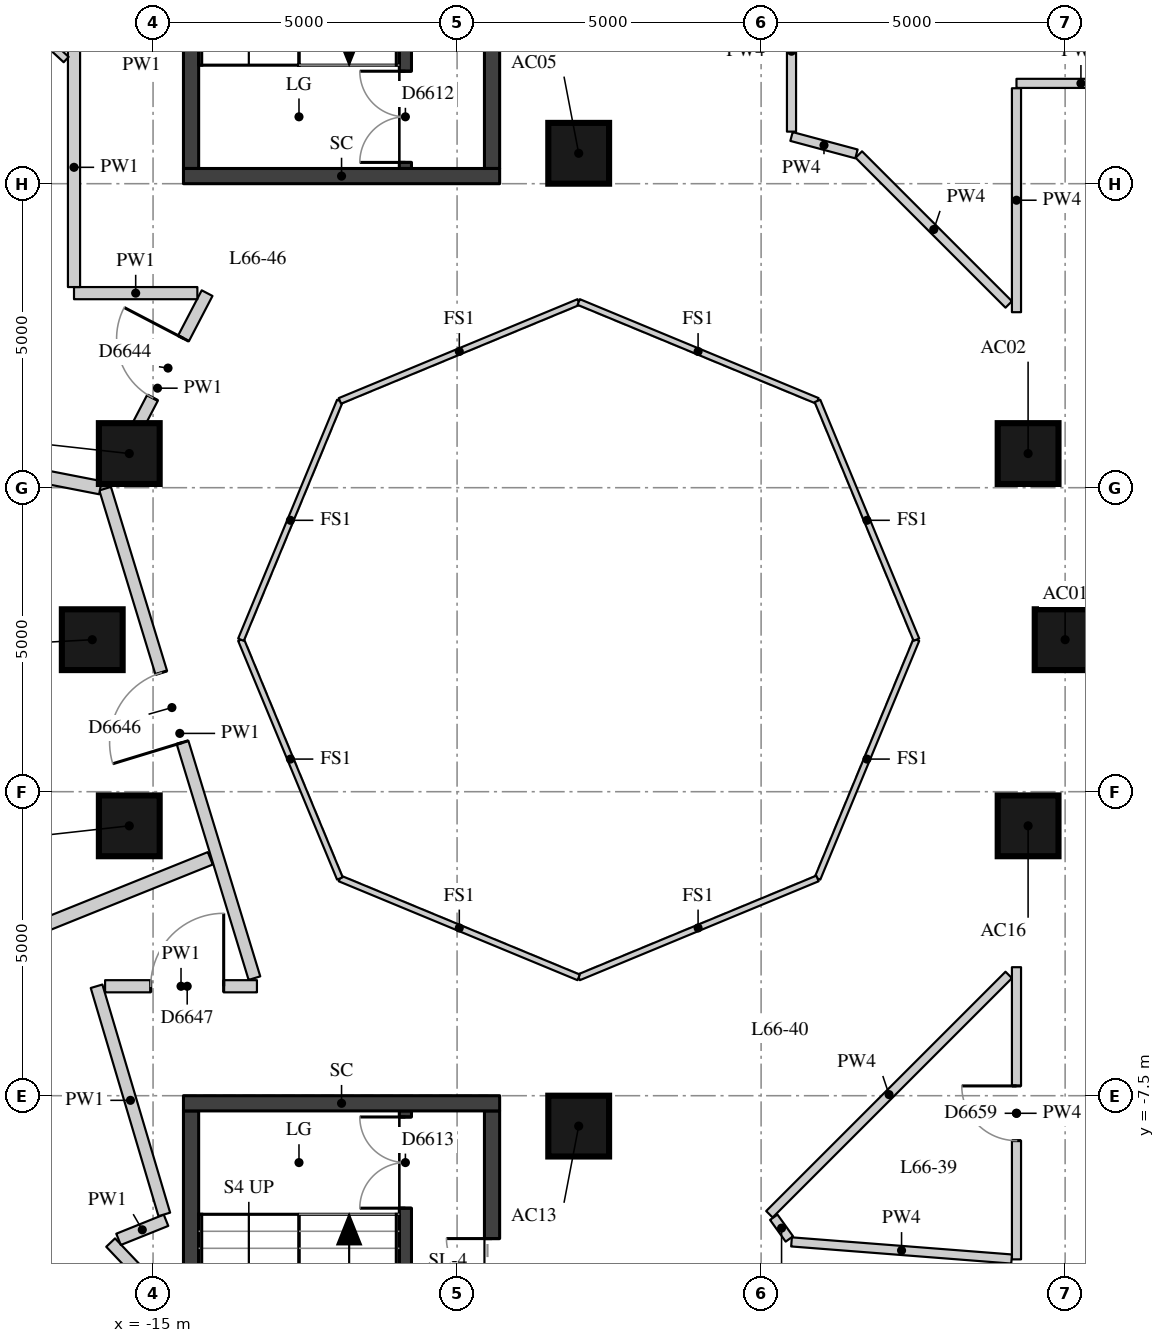
"""IFC4 building model, lengths in metres.
Left out: names, types, materials, properties, quantities, classifications, styles, units other than length and angle.
Written with IfcOpenShell. Run it as: python <this file> out.ifc"""

import sys

from ifc_helpers import new_model, si_unit, direction, frame, frame_2d, origin, origin_2d, place, context, subcontext, project, spatial, rectangle, extrude, element, fill, save


model = new_model("IFC4")
c1 = context("Model", 3, precision=1e-05, world=origin(), true_north=direction((0.0, 1.0)))
c2 = subcontext(c1, "Body", "Model", "MODEL_VIEW")
j1 = project(units=[si_unit("LENGTHUNIT", "METRE"), si_unit("PLANEANGLEUNIT", "RADIAN")], contexts=[c1])
p1 = place(None, origin())
s1 = spatial("IfcSite", under=j1, at=p1, CompositionType="ELEMENT")
p2 = place(p1, origin())
s2 = spatial("IfcBuilding", under=s1, at=p2, CompositionType="ELEMENT")
p3 = place(p2, frame((0.0, 0.0, 233.3)))
s3 = spatial("IfcBuildingStorey", under=s2, at=p3, CompositionType="ELEMENT", Elevation=233.3)
for number, where, z_axis, x_axis in (
    (1, (0.0, 0.0, 0.0), (0.0, 0.0, 1.0), (1.0, 0.0, 0.0)),
    (2, (-0.609, 3.062, 0.0), (0.0, 0.0, 1.0), (1.0, 0.0, 0.0)),
    (3, (-8.0, 8.0, 0.0), (0.0, 0.0, 1.0), (1.0, 0.0, 0.0)),
    (4, (-15.391, 3.062, 0.0), (0.0, 0.0, 1.0), (1.0, 0.0, 0.0)),
    (5, (-16.0, 0.0, 0.0), (0.0, 0.0, 1.0), (1.0, 0.0, 0.0)),
    (6, (-15.391, -3.062, 0.0), (0.0, 0.0, 1.0), (1.0, 0.0, 0.0)),
    (7, (-8.0, -8.0, 0.0), (0.0, 0.0, 1.0), (1.0, 0.0, 0.0)),
    (8, (-0.609, -3.062, 0.0), (0.0, 0.0, 1.0), (1.0, 0.0, 0.0)),
):
    element("IfcColumn", number, at=place(p3, frame(where, z_axis=z_axis, x_axis=x_axis)), inside=s3, PredefinedType="COLUMN", context=c2, shape_type="SweptSolid", body=[
        extrude(rectangle(XDim=1.0, YDim=1.0, at=origin_2d()), origin(), (0.0, 0.0, 1.0), 3.3),
    ])
p4 = place(p3, frame((-10.85, 7.75, 0.0), z_axis=(0.0, 0.0, 1.0), x_axis=(0.0, 1.0, 0.0)))
e9 = element("IfcWall", 9, at=p4, inside=s3, PredefinedType="SHEAR", context=c2, shape_type="SweptSolid", body=[
    extrude(rectangle(XDim=6.0, YDim=0.2, at=frame_2d((3.0, 0.0))), origin(), (0.0, 0.0, 1.0), 3.02),
])
p5 = place(p4, frame((0.1, 0.0, 0.0)))
e10 = element("IfcOpeningElement", 10, at=p5, cuts=e9, PredefinedType="OPENING", context=c2, shape_type="SweptSolid", body=[
    extrude(rectangle(XDim=1.5, YDim=2.1, at=frame_2d((0.75, 1.05))), frame((0.0, 0.11, 0.0), z_axis=(0.0, -1.0, 0.0), x_axis=(1.0, 0.0, 0.0)), (0.0, 0.0, 1.0), 0.22),
])
p6 = place(p3, frame((-10.85, -13.75, 0.0), z_axis=(0.0, 0.0, 1.0), x_axis=(0.0, 1.0, 0.0)))
e11 = element("IfcWall", 11, at=p6, inside=s3, PredefinedType="SHEAR", context=c2, shape_type="SweptSolid", body=[
    extrude(rectangle(XDim=6.0, YDim=0.2, at=frame_2d((3.0, 0.0))), origin(), (0.0, 0.0, 1.0), 3.02),
])
p7 = place(p6, frame((4.4, 0.0, 0.0)))
e12 = element("IfcOpeningElement", 12, at=p7, cuts=e11, PredefinedType="OPENING", context=c2, shape_type="SweptSolid", body=[
    extrude(rectangle(XDim=1.5, YDim=2.1, at=frame_2d((0.75, 1.05))), frame((0.0, 0.11, 0.0), z_axis=(0.0, -1.0, 0.0), x_axis=(1.0, 0.0, 0.0)), (0.0, 0.0, 1.0), 0.22),
])
p8 = place(p3, frame((-14.375, 7.75, -0.28), z_axis=(0.0, 0.0, 1.0), x_axis=(0.0, 1.0, 0.0)))
e13 = element("IfcWall", 13, at=p8, inside=s3, PredefinedType="SHEAR", context=c2, shape_type="SweptSolid", body=[
    extrude(rectangle(XDim=6.0, YDim=0.25, at=frame_2d((3.0, 0.0))), origin(), (0.0, 0.0, 1.0), 3.3),
])
p9 = place(p3, frame((-9.425, 7.75, -0.28), z_axis=(0.0, 0.0, 1.0), x_axis=(0.0, 1.0, 0.0)))
e14 = element("IfcWall", 14, at=p9, inside=s3, PredefinedType="SHEAR", context=c2, shape_type="SweptSolid", body=[
    extrude(rectangle(XDim=6.0, YDim=0.25, at=frame_2d((3.0, 0.0))), origin(), (0.0, 0.0, 1.0), 3.3),
])
p10 = place(p9, frame((2.1, 0.0, 0.28)))
e15 = element("IfcOpeningElement", 15, at=p10, cuts=e14, PredefinedType="OPENING", context=c2, shape_type="SweptSolid", body=[
    extrude(rectangle(XDim=1.5, YDim=2.1, at=frame_2d((0.75, 1.05))), frame((0.0, 0.135, 0.0), z_axis=(0.0, -1.0, 0.0), x_axis=(1.0, 0.0, 0.0)), (0.0, 0.0, 1.0), 0.27),
])
p11 = place(p3, frame((-14.5, 7.625, -0.28), z_axis=(0.0, 0.0, 1.0), x_axis=(1.0, 0.0, 0.0)))
e16 = element("IfcWall", 16, at=p11, inside=s3, PredefinedType="SHEAR", context=c2, shape_type="SweptSolid", body=[
    extrude(rectangle(XDim=5.2, YDim=0.25, at=frame_2d((2.6, 0.0))), origin(), (0.0, 0.0, 1.0), 3.3),
])
p12 = place(p3, frame((-14.375, -13.75, -0.28), z_axis=(0.0, 0.0, 1.0), x_axis=(0.0, 1.0, 0.0)))
e17 = element("IfcWall", 17, at=p12, inside=s3, PredefinedType="SHEAR", context=c2, shape_type="SweptSolid", body=[
    extrude(rectangle(XDim=6.0, YDim=0.25, at=frame_2d((3.0, 0.0))), origin(), (0.0, 0.0, 1.0), 3.3),
])
p13 = place(p3, frame((-9.425, -13.75, -0.28), z_axis=(0.0, 0.0, 1.0), x_axis=(0.0, 1.0, 0.0)))
e18 = element("IfcWall", 18, at=p13, inside=s3, PredefinedType="SHEAR", context=c2, shape_type="SweptSolid", body=[
    extrude(rectangle(XDim=6.0, YDim=0.25, at=frame_2d((3.0, 0.0))), origin(), (0.0, 0.0, 1.0), 3.3),
])
p14 = place(p13, frame((2.4, 0.0, 0.28)))
e19 = element("IfcOpeningElement", 19, at=p14, cuts=e18, PredefinedType="OPENING", context=c2, shape_type="SweptSolid", body=[
    extrude(rectangle(XDim=1.5, YDim=2.1, at=frame_2d((0.75, 1.05))), frame((0.0, 0.135, 0.0), z_axis=(0.0, -1.0, 0.0), x_axis=(1.0, 0.0, 0.0)), (0.0, 0.0, 1.0), 0.27),
])
p15 = place(p3, frame((-14.5, -7.625, -0.28), z_axis=(0.0, 0.0, 1.0), x_axis=(1.0, 0.0, 0.0)))
e20 = element("IfcWall", 20, at=p15, inside=s3, PredefinedType="SHEAR", context=c2, shape_type="SweptSolid", body=[
    extrude(rectangle(XDim=5.2, YDim=0.25, at=frame_2d((2.6, 0.0))), origin(), (0.0, 0.0, 1.0), 3.3),
])
p16 = place(p3, frame((-14.563, -11.111, 0.0), z_axis=(0.0, 0.0, 1.0), x_axis=(-0.688574238414, 0.725165855645, 0.0)))
e21 = element("IfcWall", 21, at=p16, inside=s3, PredefinedType="PARTITIONING", context=c2, shape_type="SweptSolid", body=[
    extrude(rectangle(XDim=1.648, YDim=0.2, at=frame_2d((0.824, 0.0))), origin(), (0.0, 0.0, 1.0), 3.02),
])
p17 = place(p3, frame((-15.568, -9.863, 0.0), z_axis=(0.0, 0.0, 1.0), x_axis=(0.92779485846, 0.373090740457, 0.0)))
e22 = element("IfcWall", 22, at=p17, inside=s3, PredefinedType="PARTITIONING", context=c2, shape_type="SweptSolid", body=[
    extrude(rectangle(XDim=0.842, YDim=0.2, at=frame_2d((0.421, 0.0))), origin(), (0.0, 0.0, 1.0), 3.02),
])
p18 = place(p3, frame((-14.815, -9.452, 0.0), z_axis=(0.0, 0.0, 1.0), x_axis=(-0.284600079658, 0.958646334504, 0.0)))
e23 = element("IfcWall", 23, at=p18, inside=s3, PredefinedType="PARTITIONING", context=c2, shape_type="SweptSolid", body=[
    extrude(rectangle(XDim=3.914, YDim=0.2, at=frame_2d((1.957, 0.0))), origin(), (0.0, 0.0, 1.0), 3.02),
])
p19 = place(p3, frame((-15.789, -5.7, 0.0), z_axis=(0.0, 0.0, 1.0), x_axis=(1.0, 0.0, 0.0)))
e24 = element("IfcWall", 24, at=p19, inside=s3, PredefinedType="PARTITIONING", context=c2, shape_type="SweptSolid", body=[
    extrude(rectangle(XDim=2.497, YDim=0.2, at=frame_2d((1.249, 0.0))), origin(), (0.0, 0.0, 1.0), 3.02),
])
p20 = place(p19, frame((0.75, 0.0, 0.0)))
e25 = element("IfcOpeningElement", 25, at=p20, cuts=e24, PredefinedType="OPENING", context=c2, shape_type="SweptSolid", body=[
    extrude(rectangle(XDim=1.2, YDim=2.1, at=frame_2d((0.6, 1.05))), frame((0.0, 0.11, 0.0), z_axis=(0.0, -1.0, 0.0), x_axis=(1.0, 0.0, 0.0)), (0.0, 0.0, 1.0), 0.22),
])
p21 = place(p3, frame((-13.333, -5.567, 0.0), z_axis=(0.0, 0.0, 1.0), x_axis=(-0.291732883234, 0.956499830026, 0.0)))
e26 = element("IfcWall", 26, at=p21, inside=s3, PredefinedType="PARTITIONING", context=c2, shape_type="SweptSolid", body=[
    extrude(rectangle(XDim=8.417, YDim=0.2, at=frame_2d((4.208, 0.0))), origin(), (0.0, 0.0, 1.0), 3.02),
])
p22 = place(p21, frame((4.053, 0.0, 0.0)))
e27 = element("IfcOpeningElement", 27, at=p22, cuts=e26, PredefinedType="OPENING", context=c2, shape_type="SweptSolid", body=[
    extrude(rectangle(XDim=1.2, YDim=2.1, at=frame_2d((0.6, 1.05))), frame((0.0, 0.11, 0.0), z_axis=(0.0, -1.0, 0.0), x_axis=(1.0, 0.0, 0.0)), (0.0, 0.0, 1.0), 0.22),
])
p23 = place(p3, frame((-15.742, 2.573, 0.0), z_axis=(0.0, 0.0, 1.0), x_axis=(0.462435860297, 0.886652736482, 0.0)))
e28 = element("IfcWall", 28, at=p23, inside=s3, PredefinedType="PARTITIONING", context=c2, shape_type="SweptSolid", body=[
    extrude(rectangle(XDim=3.526, YDim=0.2, at=frame_2d((1.763, 0.0))), origin(), (0.0, 0.0, 1.0), 3.02),
])
p24 = place(p23, frame((1.586, 0.0, 0.0)))
e29 = element("IfcOpeningElement", 29, at=p24, cuts=e28, PredefinedType="OPENING", context=c2, shape_type="SweptSolid", body=[
    extrude(rectangle(XDim=1.1, YDim=2.1, at=frame_2d((0.55, 1.05))), frame((0.0, 0.11, 0.0), z_axis=(0.0, -1.0, 0.0), x_axis=(1.0, 0.0, 0.0)), (0.0, 0.0, 1.0), 0.22),
])
p25 = place(p3, frame((-14.271, 5.7, 0.0), z_axis=(0.0, 0.0, 1.0), x_axis=(-1.0, 0.0, 0.0)))
e30 = element("IfcWall", 30, at=p25, inside=s3, PredefinedType="PARTITIONING", context=c2, shape_type="SweptSolid", body=[
    extrude(rectangle(XDim=2.029, YDim=0.2, at=frame_2d((1.014, 0.0))), origin(), (0.0, 0.0, 1.0), 3.02),
])
p26 = place(p3, frame((-16.3, 5.8, 0.0), z_axis=(0.0, 0.0, 1.0), x_axis=(0.0, 1.0, 0.0)))
e31 = element("IfcWall", 31, at=p26, inside=s3, PredefinedType="PARTITIONING", context=c2, shape_type="SweptSolid", body=[
    extrude(rectangle(XDim=3.939, YDim=0.2, at=frame_2d((1.969, 0.0))), origin(), (0.0, 0.0, 1.0), 3.02),
])
p27 = place(p3, frame((1.32, 9.15, 0.0), z_axis=(0.0, 0.0, 1.0), x_axis=(-1.0, 0.0, 0.0)))
e32 = element("IfcWall", 32, at=p27, inside=s3, PredefinedType="PARTITIONING", context=c2, shape_type="SweptSolid", body=[
    extrude(rectangle(XDim=2.12, YDim=0.15, at=frame_2d((1.06, 0.0))), origin(), (0.0, 0.0, 1.0), 3.02),
])
p28 = place(p3, frame((-0.8, 9.07, 0.0), z_axis=(0.0, 0.0, 1.0), x_axis=(0.0, -1.0, 0.0)))
e33 = element("IfcWall", 33, at=p28, inside=s3, PredefinedType="PARTITIONING", context=c2, shape_type="SweptSolid", body=[
    extrude(rectangle(XDim=3.683, YDim=0.15, at=frame_2d((1.842, 0.0))), origin(), (0.0, 0.0, 1.0), 3.02),
])
p29 = place(p3, frame((-0.927, 5.514, 0.0), z_axis=(0.0, 0.0, 1.0), x_axis=(-0.707106781187, 0.707106781187, 0.0)))
e34 = element("IfcWall", 34, at=p29, inside=s3, PredefinedType="PARTITIONING", context=c2, shape_type="SweptSolid", body=[
    extrude(rectangle(XDim=3.487, YDim=0.15, at=frame_2d((1.743, 0.0))), origin(), (0.0, 0.0, 1.0), 3.02),
])
p30 = place(p3, frame((-3.432, 7.99, 0.0), z_axis=(0.0, 0.0, 1.0), x_axis=(-0.965900750832, 0.258912609855, 0.0)))
e35 = element("IfcWall", 35, at=p30, inside=s3, PredefinedType="PARTITIONING", context=c2, shape_type="SweptSolid", body=[
    extrude(rectangle(XDim=1.106, YDim=0.15, at=frame_2d((0.553, 0.0))), origin(), (0.0, 0.0, 1.0), 3.02),
])
p31 = place(p3, frame((-4.5, 8.356, 0.0), z_axis=(0.0, 0.0, 1.0), x_axis=(0.0, 1.0, 0.0)))
e36 = element("IfcWall", 36, at=p31, inside=s3, PredefinedType="PARTITIONING", context=c2, shape_type="SweptSolid", body=[
    extrude(rectangle(XDim=2.645, YDim=0.15, at=frame_2d((1.323, 0.0))), origin(), (0.0, 0.0, 1.0), 3.02),
])
p32 = place(p3, frame((-0.8, -5.386, 0.0), z_axis=(0.0, 0.0, 1.0), x_axis=(0.0, -1.0, 0.0)))
e37 = element("IfcWall", 37, at=p32, inside=s3, PredefinedType="PARTITIONING", context=c2, shape_type="SweptSolid", body=[
    extrude(rectangle(XDim=4.805, YDim=0.15, at=frame_2d((2.403, 0.0))), origin(), (0.0, 0.0, 1.0), 3.02),
])
p33 = place(p32, frame((1.953, 0.0, 0.0)))
e38 = element("IfcOpeningElement", 38, at=p33, cuts=e37, PredefinedType="OPENING", context=c2, shape_type="SweptSolid", body=[
    extrude(rectangle(XDim=0.9, YDim=2.1, at=frame_2d((0.45, 1.05))), frame((0.0, 0.085, 0.0), z_axis=(0.0, -1.0, 0.0), x_axis=(1.0, 0.0, 0.0)), (0.0, 0.0, 1.0), 0.17),
])
p34 = place(p3, frame((-0.88, -10.186, 0.0), z_axis=(0.0, 0.0, 1.0), x_axis=(-0.996990060313, 0.077529475925, 0.0)))
e39 = element("IfcWall", 39, at=p34, inside=s3, PredefinedType="PARTITIONING", context=c2, shape_type="SweptSolid", body=[
    extrude(rectangle(XDim=3.631, YDim=0.15, at=frame_2d((1.815, 0.0))), origin(), (0.0, 0.0, 1.0), 3.02),
])
p35 = place(p3, frame((-4.535, -9.856, 0.0), z_axis=(0.0, 0.0, 1.0), x_axis=(-0.583807558681, 0.811892070676, 0.0)))
e40 = element("IfcWall", 40, at=p35, inside=s3, PredefinedType="PARTITIONING", context=c2, shape_type="SweptSolid", body=[
    extrude(rectangle(XDim=0.44, YDim=0.15, at=frame_2d((0.22, 0.0))), origin(), (0.0, 0.0, 1.0), 3.02),
])
p36 = place(p3, frame((-4.864, -9.45, 0.0), z_axis=(0.0, 0.0, 1.0), x_axis=(0.707106781187, 0.707106781187, 0.0)))
e41 = element("IfcWall", 41, at=p36, inside=s3, PredefinedType="PARTITIONING", context=c2, shape_type="SweptSolid", body=[
    extrude(rectangle(XDim=5.566, YDim=0.15, at=frame_2d((2.783, 0.0))), origin(), (0.0, 0.0, 1.0), 3.02),
])
p37 = place(p3, frame((-21.724, 3.643, 0.0), z_axis=(0.0, 0.0, 1.0), x_axis=(0.981479525595, -0.191567066159, 0.0)))
e42 = element("IfcWall", 42, at=p37, inside=s3, PredefinedType="PARTITIONING", context=c2, shape_type="SweptSolid", body=[
    extrude(rectangle(XDim=5.968, YDim=0.22, at=frame_2d((2.984, 0.0))), origin(), (0.0, 0.0, 1.0), 2.57),
])
p38 = place(p3, frame((-20.759, -6.295, 0.0), z_axis=(0.0, 0.0, 1.0), x_axis=(0.927536731172, 0.373732006023, 0.0)))
e43 = element("IfcWall", 43, at=p38, inside=s3, PredefinedType="PARTITIONING", context=c2, shape_type="SweptSolid", body=[
    extrude(rectangle(XDim=7.224, YDim=0.22, at=frame_2d((3.612, 0.0))), origin(), (0.0, 0.0, 1.0), 3.02),
])
p39 = place(p3, frame((-16.429, 9.541, 0.0), z_axis=(0.0, 0.0, 1.0), x_axis=(-0.732625124054, 0.680632373315, 0.0)))
e44 = element("IfcWall", 44, at=p39, inside=s3, PredefinedType="PARTITIONING", context=c2, shape_type="SweptSolid", body=[
    extrude(rectangle(XDim=2.066, YDim=0.12, at=frame_2d((1.033, 0.0))), origin(), (0.0, 0.0, 1.0), 3.02),
])
for number, where, z_axis, x_axis in (
    (45, (-2.446, 0.0, 0.0), (0.0, 0.0, 1.0), (-0.383, -0.924, 0.0)),
    (46, (-4.073, -3.927, 0.0), (0.0, 0.0, 1.0), (-0.924, -0.383, 0.0)),
    (47, (-8.0, -5.554, 0.0), (0.0, 0.0, 1.0), (-0.924, 0.383, 0.0)),
    (48, (-11.927, -3.927, 0.0), (0.0, 0.0, 1.0), (-0.383, 0.924, 0.0)),
    (49, (-13.554, 0.0, 0.0), (0.0, 0.0, 1.0), (0.383, 0.924, 0.0)),
    (50, (-11.927, 3.927, 0.0), (0.0, 0.0, 1.0), (0.924, 0.383, 0.0)),
    (51, (-8.0, 5.554, 0.0), (0.0, 0.0, 1.0), (0.924, -0.383, 0.0)),
    (52, (-4.073, 3.927, 0.0), (0.0, 0.0, 1.0), (0.383, -0.924, 0.0)),
):
    element("IfcWall", number, at=place(p3, frame(where, z_axis=z_axis, x_axis=x_axis)), inside=s3, PredefinedType="PARTITIONING", context=c2, shape_type="SweptSolid", body=[
        extrude(rectangle(XDim=4.251, YDim=0.1, at=frame_2d((2.125, 0.0))), origin(), (0.0, 0.0, 1.0), 3.02),
    ])
p40 = place(p5, origin())
e53 = element("IfcDoor", 53, at=p40, inside=s3, OperationType="DOUBLE_DOOR_SINGLE_SWING", PredefinedType="DOOR", context=c2, shape_type="SweptSolid", body=[
    extrude(rectangle(XDim=1.5, YDim=2.1, at=frame_2d((0.75, 1.05))), frame((0.0, 0.025, 0.0), z_axis=(0.0, -1.0, 0.0), x_axis=(1.0, 0.0, 0.0)), (0.0, 0.0, 1.0), 0.05),
])
fill(e10, e53)
p41 = place(p7, origin())
e54 = element("IfcDoor", 54, at=p41, inside=s3, OperationType="DOUBLE_DOOR_SINGLE_SWING", PredefinedType="DOOR", context=c2, shape_type="SweptSolid", body=[
    extrude(rectangle(XDim=1.5, YDim=2.1, at=frame_2d((0.75, 1.05))), frame((0.0, 0.025, 0.0), z_axis=(0.0, -1.0, 0.0), x_axis=(1.0, 0.0, 0.0)), (0.0, 0.0, 1.0), 0.05),
])
fill(e12, e54)
p42 = place(p14, origin())
e55 = element("IfcDoor", 55, at=p42, inside=s3, OperationType="DOUBLE_DOOR_SINGLE_SWING", PredefinedType="DOOR", context=c2, shape_type="SweptSolid", body=[
    extrude(rectangle(XDim=1.5, YDim=2.1, at=frame_2d((0.75, 1.05))), frame((0.0, 0.025, 0.0), z_axis=(0.0, -1.0, 0.0), x_axis=(1.0, 0.0, 0.0)), (0.0, 0.0, 1.0), 0.05),
])
fill(e19, e55)
p43 = place(p24, origin())
e56 = element("IfcDoor", 56, at=p43, inside=s3, OperationType="SINGLE_SWING_RIGHT", PredefinedType="DOOR", context=c2, shape_type="SweptSolid", body=[
    extrude(rectangle(XDim=1.1, YDim=2.1, at=frame_2d((0.55, 1.05))), frame((0.0, 0.025, 0.0), z_axis=(0.0, -1.0, 0.0), x_axis=(1.0, 0.0, 0.0)), (0.0, 0.0, 1.0), 0.05),
])
fill(e29, e56)
p44 = place(p22, origin())
e57 = element("IfcDoor", 57, at=p44, inside=s3, OperationType="SINGLE_SWING_LEFT", PredefinedType="DOOR", context=c2, shape_type="SweptSolid", body=[
    extrude(rectangle(XDim=1.2, YDim=2.1, at=frame_2d((0.6, 1.05))), frame((0.0, 0.025, 0.0), z_axis=(0.0, -1.0, 0.0), x_axis=(1.0, 0.0, 0.0)), (0.0, 0.0, 1.0), 0.05),
])
fill(e27, e57)
p45 = place(p20, origin())
e58 = element("IfcDoor", 58, at=p45, inside=s3, OperationType="SINGLE_SWING_RIGHT", PredefinedType="DOOR", context=c2, shape_type="SweptSolid", body=[
    extrude(rectangle(XDim=1.2, YDim=2.1, at=frame_2d((0.6, 1.05))), frame((0.0, 0.025, 0.0), z_axis=(0.0, -1.0, 0.0), x_axis=(1.0, 0.0, 0.0)), (0.0, 0.0, 1.0), 0.05),
])
fill(e25, e58)
p46 = place(p33, origin())
e59 = element("IfcDoor", 59, at=p46, inside=s3, OperationType="SINGLE_SWING_RIGHT", PredefinedType="DOOR", context=c2, shape_type="SweptSolid", body=[
    extrude(rectangle(XDim=0.9, YDim=2.1, at=frame_2d((0.45, 1.05))), frame((0.0, 0.025, 0.0), z_axis=(0.0, -1.0, 0.0), x_axis=(1.0, 0.0, 0.0)), (0.0, 0.0, 1.0), 0.05),
])
fill(e38, e59)
save(model, sys.argv[1])
